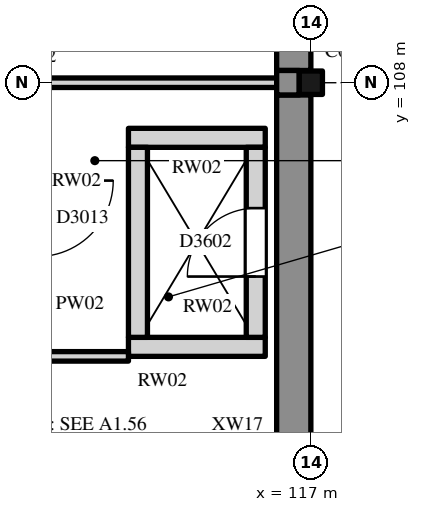
"""IFC4 building model, lengths in metres.
Left out: names, types, materials, properties, quantities, classifications, styles, units other than length and angle.
Written with IfcOpenShell. Run it as: python <this file> out.ifc"""

import sys

from ifc_helpers import new_model, si_unit, direction, frame, frame_2d, origin, origin_2d, place, context, subcontext, project, spatial, rectangle, i_section, extrude, element, fill, save


model = new_model("IFC4")
c1 = context("Model", 3, precision=1e-05, world=origin(), true_north=direction((0.0, 1.0)))
c2 = subcontext(c1, "Body", "Model", "MODEL_VIEW")
j1 = project(units=[si_unit("LENGTHUNIT", "METRE"), si_unit("PLANEANGLEUNIT", "RADIAN")], contexts=[c1])
p1 = place(None, origin())
s1 = spatial("IfcSite", under=j1, at=p1, CompositionType="ELEMENT")
p2 = place(p1, origin())
s2 = spatial("IfcBuilding", under=s1, at=p2, CompositionType="ELEMENT")
p3 = place(p2, frame((0.0, 0.0, 16.0)))
s3 = spatial("IfcBuildingStorey", under=s2, at=p3, CompositionType="ELEMENT", Elevation=16.0)
p4 = place(p3, frame((117.0, 108.0, 0.0), z_axis=(0.0, 0.0, 1.0), x_axis=(1.0, 0.0, 0.0)))
e1 = element("IfcColumn", 1, at=p4, inside=s3, PredefinedType="COLUMN", context=c2, shape_type="SweptSolid", body=[
    extrude(i_section(OverallWidth=0.305, OverallDepth=0.308, WebThickness=0.01, FlangeThickness=0.015, FilletRadius=0.017, at=origin_2d()), origin(), (0.0, 0.0, 1.0), 10.0),
])
for number, where, z_axis, x_axis in (
    (2, (114.6, 104.525, 0.0), (0.0, 0.0, 1.0), (1.0, 0.0, 0.0)),
    (3, (114.6, 107.275, 0.0), (0.0, 0.0, 1.0), (1.0, 0.0, 0.0)),
):
    element("IfcWall", number, at=place(p3, frame(where, z_axis=z_axis, x_axis=x_axis)), inside=s3, PredefinedType="STANDARD", context=c2, shape_type="SweptSolid", body=[
        extrude(rectangle(XDim=1.8, YDim=0.25, at=frame_2d((0.9, 0.0))), origin(), (0.0, 0.0, 1.0), 10.0),
    ])
p5 = place(p3, frame((114.725, 104.65, 0.0), z_axis=(0.0, 0.0, 1.0), x_axis=(0.0, 1.0, 0.0)))
e4 = element("IfcWall", 4, at=p5, inside=s3, PredefinedType="STANDARD", context=c2, shape_type="SweptSolid", body=[
    extrude(rectangle(XDim=2.5, YDim=0.25, at=frame_2d((1.25, 0.0))), origin(), (0.0, 0.0, 1.0), 10.0),
])
p6 = place(p3, frame((116.275, 104.65, 0.0), z_axis=(0.0, 0.0, 1.0), x_axis=(0.0, 1.0, 0.0)))
e5 = element("IfcWall", 5, at=p6, inside=s3, PredefinedType="STANDARD", context=c2, shape_type="SweptSolid", body=[
    extrude(rectangle(XDim=2.5, YDim=0.25, at=frame_2d((1.25, 0.0))), origin(), (0.0, 0.0, 1.0), 10.0),
])
p7 = place(p6, frame((0.8, 0.0, 0.0)))
e6 = element("IfcOpeningElement", 6, at=p7, cuts=e5, PredefinedType="OPENING", context=c2, shape_type="SweptSolid", body=[
    extrude(rectangle(XDim=0.9, YDim=2.1, at=frame_2d((0.45, 1.05))), frame((0.0, 0.135, 0.0), z_axis=(0.0, -1.0, 0.0), x_axis=(1.0, 0.0, 0.0)), (0.0, 0.0, 1.0), 0.27),
])
p8 = place(p3, frame((116.775, 99.161, 0.0), z_axis=(0.0, 0.0, 1.0), x_axis=(0.0, 1.0, 0.0)))
e7 = element("IfcWall", 7, at=p8, inside=s3, PredefinedType="SOLIDWALL", context=c2, shape_type="SweptSolid", body=[
    extrude(rectangle(XDim=8.678, YDim=0.45, at=frame_2d((4.339, 0.0))), origin(), (0.0, 0.0, 1.0), 9.371),
])
p9 = place(p3, frame((116.775, 108.161, 0.0), z_axis=(0.0, 0.0, 1.0), x_axis=(0.0, 1.0, 0.0)))
e8 = element("IfcWall", 8, at=p9, inside=s3, PredefinedType="SOLIDWALL", context=c2, shape_type="SweptSolid", body=[
    extrude(rectangle(XDim=8.676, YDim=0.45, at=frame_2d((4.338, 0.0))), origin(), (0.0, 0.0, 1.0), 9.371),
])
p10 = place(p9, frame((0.589, 0.0, 6.4)))
e9 = element("IfcOpeningElement", 9, at=p10, cuts=e8, PredefinedType="OPENING", context=c2, shape_type="SweptSolid", body=[
    extrude(rectangle(XDim=7.5, YDim=1.2, at=frame_2d((3.75, 0.6))), frame((0.0, 0.235, 0.0), z_axis=(0.0, -1.0, 0.0), x_axis=(1.0, 0.0, 0.0)), (0.0, 0.0, 1.0), 0.47),
])
p11 = place(p9, frame((0.596, 0.0, 1.6)))
e10 = element("IfcOpeningElement", 10, at=p11, cuts=e8, PredefinedType="OPENING", context=c2, shape_type="SweptSolid", body=[
    extrude(rectangle(XDim=7.5, YDim=1.2, at=frame_2d((3.75, 0.6))), frame((0.0, 0.235, 0.0), z_axis=(0.0, -1.0, 0.0), x_axis=(1.0, 0.0, 0.0)), (0.0, 0.0, 1.0), 0.47),
])
p12 = place(p3, frame((116.699, 107.839, 0.0), z_axis=(0.0, 0.0, 1.0), x_axis=(0.0, 1.0, 0.0)))
e11 = element("IfcWall", 11, at=p12, inside=s3, PredefinedType="SOLIDWALL", context=c2, shape_type="SweptSolid", body=[
    extrude(rectangle(XDim=0.322, YDim=0.298, at=frame_2d((0.161, 0.0))), origin(), (0.0, 0.0, 1.0), 9.371),
])
p13 = place(p3, frame((110.938, 104.4, 0.0), z_axis=(0.0, 0.0, 1.0), x_axis=(1.0, 0.0, 0.0)))
e12 = element("IfcWall", 12, at=p13, inside=s3, PredefinedType="PARTITIONING", context=c2, shape_type="SweptSolid", body=[
    extrude(rectangle(XDim=3.663, YDim=0.125, at=frame_2d((1.831, 0.0))), origin(), (0.0, 0.0, 1.0), 9.825),
])
p14 = place(p3, frame((108.153, 108.0, 0.0), z_axis=(0.0, 0.0, 1.0), x_axis=(1.0, 0.0, 0.0)))
e13 = element("IfcWall", 13, at=p14, inside=s3, PredefinedType="PARTITIONING", context=c2, shape_type="SweptSolid", body=[
    extrude(rectangle(XDim=8.397, YDim=0.125, at=frame_2d((4.199, 0.0))), origin(), (0.0, 0.0, 1.0), 9.473),
])
p15 = place(p14, frame((0.95, 0.0, 0.0)))
e14 = element("IfcOpeningElement", 14, at=p15, cuts=e13, PredefinedType="OPENING", context=c2, shape_type="SweptSolid", body=[
    extrude(rectangle(XDim=1.0, YDim=2.1, at=frame_2d((0.5, 1.05))), frame((0.0, 0.073, 0.0), z_axis=(0.0, -1.0, 0.0), x_axis=(1.0, 0.0, 0.0)), (0.0, 0.0, 1.0), 0.145),
])
p16 = place(p7, origin())
e15 = element("IfcDoor", 15, at=p16, inside=s3, OperationType="SINGLE_SWING_RIGHT", PredefinedType="DOOR", context=c2, shape_type="SweptSolid", body=[
    extrude(rectangle(XDim=0.9, YDim=2.1, at=frame_2d((0.45, 1.05))), frame((0.0, 0.025, 0.0), z_axis=(0.0, -1.0, 0.0), x_axis=(1.0, 0.0, 0.0)), (0.0, 0.0, 1.0), 0.05),
])
fill(e6, e15)
save(model, sys.argv[1])
